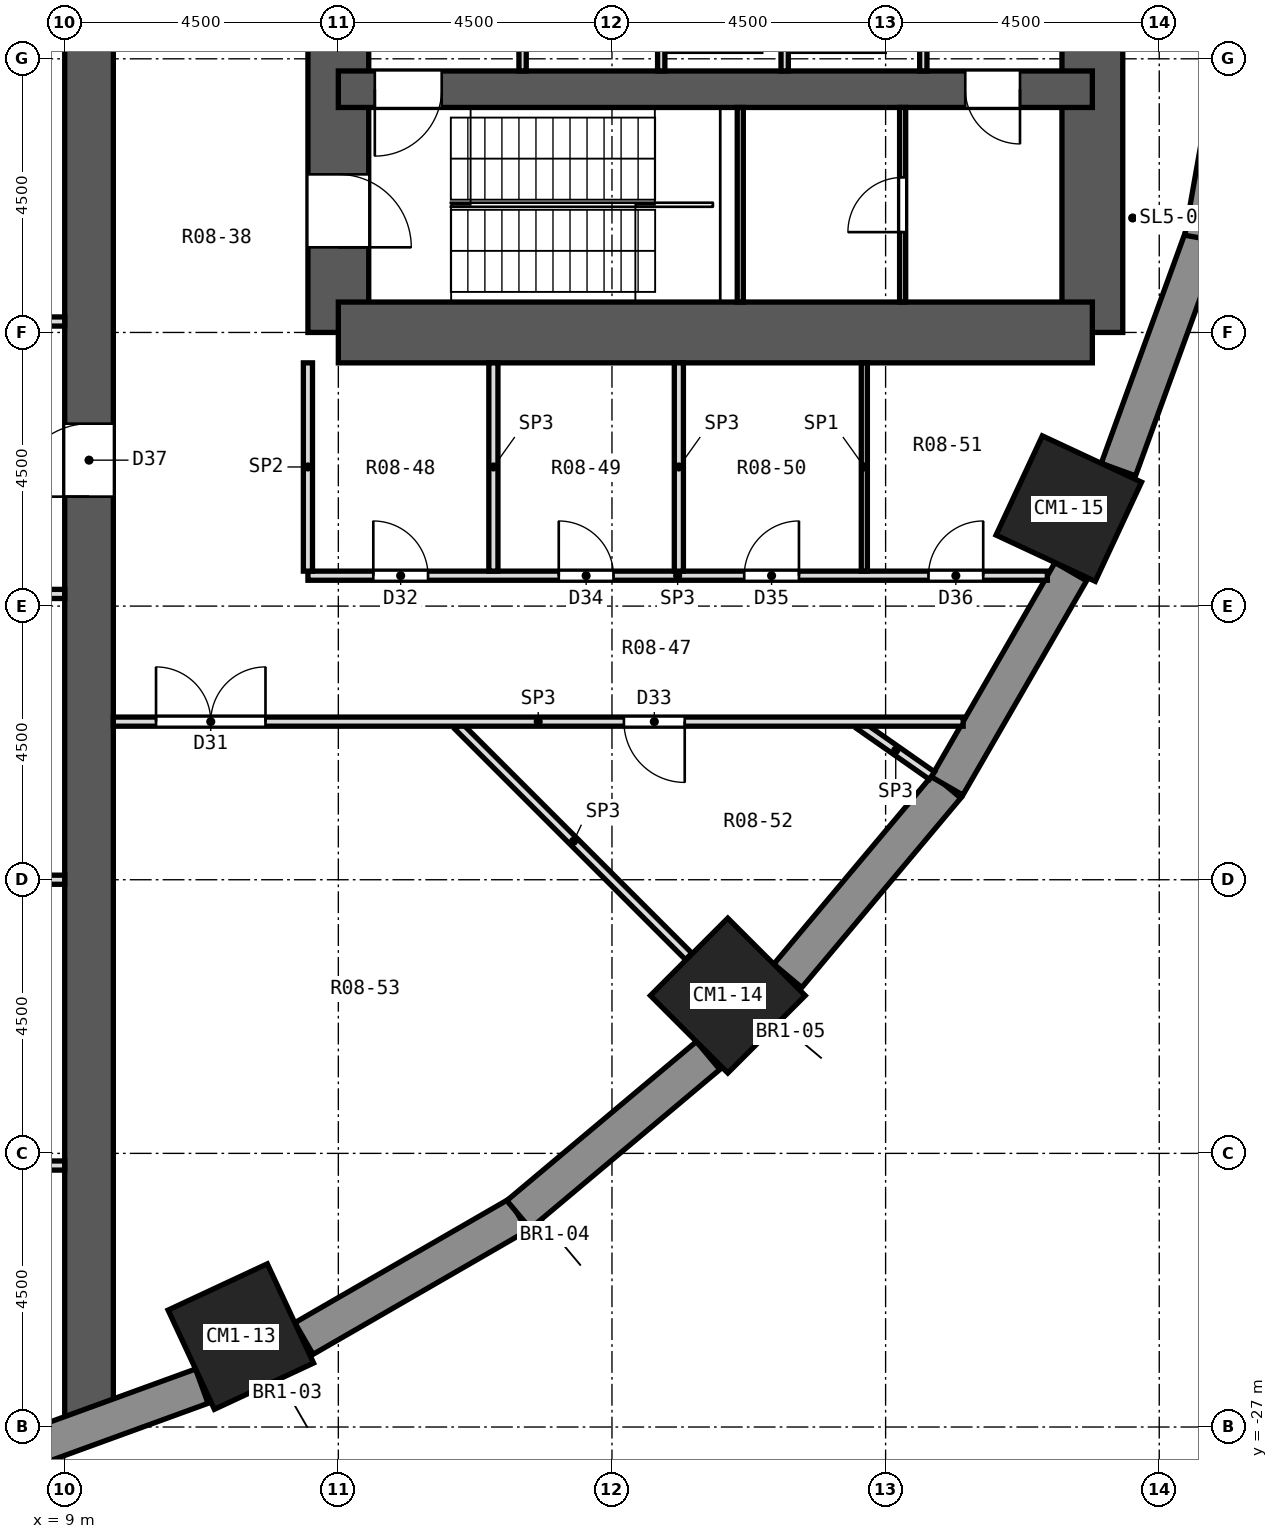
"""IFC4 building model, lengths in metres.
Left out: names, types, materials, properties, quantities, classifications, styles, units other than length and angle.
Written with IfcOpenShell. Run it as: python <this file> out.ifc"""

import sys

from ifc_helpers import new_model, si_unit, direction, frame, frame_2d, origin, origin_2d, place, context, subcontext, project, spatial, rectangle, extrude, element, fill, save


model = new_model("IFC4")
c1 = context("Model", 3, precision=1e-05, world=origin(), true_north=direction((0.0, 1.0)))
c2 = subcontext(c1, "Body", "Model", "MODEL_VIEW")
j1 = project(units=[si_unit("LENGTHUNIT", "METRE"), si_unit("PLANEANGLEUNIT", "RADIAN")], contexts=[c1])
p1 = place(None, origin())
s1 = spatial("IfcSite", under=j1, at=p1, CompositionType="ELEMENT")
p2 = place(p1, origin())
s2 = spatial("IfcBuilding", under=s1, at=p2, CompositionType="ELEMENT")
p3 = place(p2, frame((0.0, 0.0, 21.8)))
s3 = spatial("IfcBuildingStorey", under=s2, at=p3, CompositionType="ELEMENT", Elevation=21.8)
for number, where, z_axis, x_axis in (
    (1, (11.897, -25.512, 0.0), (0.0, 0.0, 1.0), (0.423, -0.906, 0.0)),
    (2, (19.905, -19.905, 0.0), (0.0, 0.0, 1.0), (0.707, -0.707, 0.0)),
    (3, (25.512, -11.897, 0.0), (0.0, 0.0, 1.0), (0.906, -0.423, 0.0)),
):
    element("IfcColumn", number, at=place(p3, frame(where, z_axis=z_axis, x_axis=x_axis)), inside=s3, PredefinedType="COLUMN", context=c2, shape_type="SweptSolid", body=[
        extrude(rectangle(XDim=1.8, YDim=1.8, at=origin_2d()), origin(), (0.0, 0.0, 1.0), 4.5),
    ])
p4 = place(p3, frame((13.5, -9.0, 0.0), z_axis=(0.0, 0.0, 1.0), x_axis=(0.0, 1.0, 0.0)))
e4 = element("IfcWall", 4, at=p4, inside=s3, PredefinedType="SHEAR", context=c2, shape_type="SweptSolid", body=[
    extrude(rectangle(XDim=18.0, YDim=1.0, at=frame_2d((9.0, 0.0))), origin(), (0.0, 0.0, 1.0), 4.5),
])
p5 = place(p4, frame((15.4, 0.0, 0.0)))
e5 = element("IfcOpeningElement", 5, at=p5, cuts=e4, PredefinedType="OPENING", context=c2, shape_type="SweptSolid", body=[
    extrude(rectangle(XDim=1.2, YDim=2.1, at=frame_2d((0.6, 1.05))), frame((0.0, 0.512, 0.0), z_axis=(0.0, -1.0, 0.0), x_axis=(1.0, 0.0, 0.0)), (0.0, 0.0, 1.0), 1.024),
])
p6 = place(p4, frame((1.4, 0.0, 0.0)))
e6 = element("IfcOpeningElement", 6, at=p6, cuts=e4, PredefinedType="OPENING", context=c2, shape_type="SweptSolid", body=[
    extrude(rectangle(XDim=1.2, YDim=2.1, at=frame_2d((0.6, 1.05))), frame((0.0, 0.512, 0.0), z_axis=(0.0, -1.0, 0.0), x_axis=(1.0, 0.0, 0.0)), (0.0, 0.0, 1.0), 1.024),
])
p7 = place(p4, frame((7.5, 0.0, 0.0)))
e7 = element("IfcOpeningElement", 7, at=p7, cuts=e4, PredefinedType="OPENING", context=c2, shape_type="SweptSolid", body=[
    extrude(rectangle(XDim=3.0, YDim=2.4, at=frame_2d((1.5, 1.2))), frame((0.0, 0.512, 0.0), z_axis=(0.0, -1.0, 0.0), x_axis=(1.0, 0.0, 0.0)), (0.0, 0.0, 1.0), 1.024),
])
p8 = place(p3, frame((25.9, -9.0, 0.0), z_axis=(0.0, 0.0, 1.0), x_axis=(0.0, 1.0, 0.0)))
e8 = element("IfcWall", 8, at=p8, inside=s3, PredefinedType="SHEAR", context=c2, shape_type="SweptSolid", body=[
    extrude(rectangle(XDim=18.0, YDim=1.0, at=frame_2d((9.0, 0.0))), origin(), (0.0, 0.0, 1.0), 4.5),
])
p9 = place(p3, frame((13.5, -9.0, 0.0), z_axis=(0.0, 0.0, 1.0), x_axis=(1.0, 0.0, 0.0)))
e9 = element("IfcWall", 9, at=p9, inside=s3, PredefinedType="SHEAR", context=c2, shape_type="SweptSolid", body=[
    extrude(rectangle(XDim=12.4, YDim=1.0, at=frame_2d((6.2, 0.0))), origin(), (0.0, 0.0, 1.0), 4.5),
])
p10 = place(p3, frame((13.5, -5.0, 0.0), z_axis=(0.0, 0.0, 1.0), x_axis=(1.0, 0.0, 0.0)))
e10 = element("IfcWall", 10, at=p10, inside=s3, PredefinedType="SHEAR", context=c2, shape_type="SweptSolid", body=[
    extrude(rectangle(XDim=12.4, YDim=0.6, at=frame_2d((6.2, 0.0))), origin(), (0.0, 0.0, 1.0), 4.5),
])
p11 = place(p10, frame((10.31, 0.0, 0.0)))
e11 = element("IfcOpeningElement", 11, at=p11, cuts=e10, PredefinedType="OPENING", context=c2, shape_type="SweptSolid", body=[
    extrude(rectangle(XDim=0.9, YDim=2.1, at=frame_2d((0.45, 1.05))), frame((0.0, 0.312, 0.0), z_axis=(0.0, -1.0, 0.0), x_axis=(1.0, 0.0, 0.0)), (0.0, 0.0, 1.0), 0.624),
])
p12 = place(p10, frame((0.6, 0.0, 0.0)))
e12 = element("IfcOpeningElement", 12, at=p12, cuts=e10, PredefinedType="OPENING", context=c2, shape_type="SweptSolid", body=[
    extrude(rectangle(XDim=1.1, YDim=2.1, at=frame_2d((0.55, 1.05))), frame((0.0, 0.312, 0.0), z_axis=(0.0, -1.0, 0.0), x_axis=(1.0, 0.0, 0.0)), (0.0, 0.0, 1.0), 0.624),
])
p13 = place(p3, frame((9.4, -27.077, 0.0), z_axis=(0.0, 0.0, 1.0), x_axis=(0.0, 1.0, 0.0)))
e13 = element("IfcWall", 13, at=p13, inside=s3, PredefinedType="SHEAR", context=c2, shape_type="SweptSolid", body=[
    extrude(rectangle(XDim=54.154, YDim=0.8, at=frame_2d((27.077, 0.0))), origin(), (0.0, 0.0, 1.0), 4.5),
])
p14 = place(p13, frame((15.377, 0.0, 0.0)))
e14 = element("IfcOpeningElement", 14, at=p14, cuts=e13, PredefinedType="OPENING", context=c2, shape_type="SweptSolid", body=[
    extrude(rectangle(XDim=1.2, YDim=2.1, at=frame_2d((0.6, 1.05))), frame((0.0, 0.412, 0.0), z_axis=(0.0, -1.0, 0.0), x_axis=(1.0, 0.0, 0.0)), (0.0, 0.0, 1.0), 0.824),
])
p15 = place(p13, frame((37.577, 0.0, 0.0)))
e15 = element("IfcOpeningElement", 15, at=p15, cuts=e13, PredefinedType="OPENING", context=c2, shape_type="SweptSolid", body=[
    extrude(rectangle(XDim=1.2, YDim=2.1, at=frame_2d((0.6, 1.05))), frame((0.0, 0.412, 0.0), z_axis=(0.0, -1.0, 0.0), x_axis=(1.0, 0.0, 0.0)), (0.0, 0.0, 1.0), 0.824),
])
p16 = place(p3, frame((7.431, -27.72, 0.0), z_axis=(0.0, 0.0, 1.0), x_axis=(0.939683013865, 0.342046536971, 0.0)))
e16 = element("IfcWall", 16, at=p16, inside=s3, PredefinedType="SOLIDWALL", context=c2, shape_type="SweptSolid", body=[
    extrude(rectangle(XDim=4.069, YDim=0.6, at=frame_2d((2.035, 0.0))), origin(), (0.0, 0.0, 1.0), 3.95),
])
p17 = place(p3, frame((12.934, -25.545, 0.0), z_axis=(0.0, 0.0, 1.0), x_axis=(0.866011732453, 0.500023678693, 0.0)))
e17 = element("IfcWall", 17, at=p17, inside=s3, PredefinedType="SOLIDWALL", context=c2, shape_type="SweptSolid", body=[
    extrude(rectangle(XDim=4.069, YDim=0.6, at=frame_2d((2.035, 0.0))), origin(), (0.0, 0.0, 1.0), 2.15),
])
for number, where, z_axis, x_axis in (
    (18, (16.464, -23.506, 0.0), (0.0, 0.0, 1.0), (0.766, 0.643, 0.0)),
    (19, (20.891, -19.581, 0.0), (0.0, 0.0, 1.0), (0.643, 0.766, 0.0)),
):
    element("IfcWall", number, at=place(p3, frame(where, z_axis=z_axis, x_axis=x_axis)), inside=s3, PredefinedType="SOLIDWALL", context=c2, shape_type="SweptSolid", body=[
        extrude(rectangle(XDim=4.069, YDim=0.6, at=frame_2d((2.035, 0.0))), origin(), (0.0, 0.0, 1.0), 2.15),
    ])
p18 = place(p3, frame((23.51, -16.458, 0.0), z_axis=(0.0, 0.0, 1.0), x_axis=(0.500023678693, 0.866011732453, 0.0)))
e20 = element("IfcWall", 20, at=p18, inside=s3, PredefinedType="SOLIDWALL", context=c2, shape_type="SweptSolid", body=[
    extrude(rectangle(XDim=4.069, YDim=0.6, at=frame_2d((2.035, 0.0))), origin(), (0.0, 0.0, 1.0), 2.15),
])
p19 = place(p3, frame((26.328, -11.255, 0.0), z_axis=(0.0, 0.0, 1.0), x_axis=(0.342034744565, 0.939687306241, 0.0)))
e21 = element("IfcWall", 21, at=p19, inside=s3, PredefinedType="SOLIDWALL", context=c2, shape_type="SweptSolid", body=[
    extrude(rectangle(XDim=4.099, YDim=0.6, at=frame_2d((2.05, 0.0))), origin(), (0.0, 0.0, 1.0), 2.15),
])
p20 = place(p3, frame((27.716, -7.454, 0.0), z_axis=(0.0, 0.0, 1.0), x_axis=(0.173673210505, 0.984803338719, 0.0)))
e22 = element("IfcWall", 22, at=p20, inside=s3, PredefinedType="SOLIDWALL", context=c2, shape_type="SweptSolid", body=[
    extrude(rectangle(XDim=4.099, YDim=0.6, at=frame_2d((2.05, 0.0))), origin(), (0.0, 0.0, 1.0), 2.15),
])
p21 = place(p3, frame((15.474, -15.474, 0.0), z_axis=(0.0, 0.0, 1.0), x_axis=(0.707197938435, -0.707015612185, 0.0)))
e23 = element("IfcWall", 23, at=p21, inside=s3, PredefinedType="PARTITIONING", context=c2, shape_type="SweptSolid", body=[
    extrude(rectangle(XDim=5.356, YDim=0.15, at=frame_2d((2.678, 0.0))), origin(), (0.0, 0.0, 1.0), 3.95),
])
p22 = place(p3, frame((22.071, -15.455, 0.0), z_axis=(0.0, 0.0, 1.0), x_axis=(0.819334469193, -0.573315818369, 0.0)))
e24 = element("IfcWall", 24, at=p22, inside=s3, PredefinedType="PARTITIONING", context=c2, shape_type="SweptSolid", body=[
    extrude(rectangle(XDim=1.454, YDim=0.15, at=frame_2d((0.727, 0.0))), origin(), (0.0, 0.0, 1.0), 3.95),
])
for number, where, z_axis, x_axis in (
    (25, (2.175, -22.7, 0.0), (0.0, 0.0, 1.0), (1.0, 0.0, 0.0)),
    (26, (2.175, -18.0, 0.0), (0.0, 0.0, 1.0), (1.0, 0.0, 0.0)),
):
    element("IfcWall", number, at=place(p3, frame(where, z_axis=z_axis, x_axis=x_axis)), inside=s3, PredefinedType="PARTITIONING", context=c2, shape_type="SweptSolid", body=[
        extrude(rectangle(XDim=6.825, YDim=0.15, at=frame_2d((3.413, 0.0))), origin(), (0.0, 0.0, 1.0), 3.95),
    ])
p23 = place(p3, frame((9.8, -15.4, 0.0), z_axis=(0.0, 0.0, 1.0), x_axis=(1.0, 0.0, 0.0)))
e27 = element("IfcWall", 27, at=p23, inside=s3, PredefinedType="PARTITIONING", context=c2, shape_type="SweptSolid", body=[
    extrude(rectangle(XDim=13.975, YDim=0.15, at=frame_2d((6.987, 0.0))), origin(), (0.0, 0.0, 1.0), 3.95),
])
p24 = place(p23, frame((0.702, 0.0, 0.0)))
e28 = element("IfcOpeningElement", 28, at=p24, cuts=e27, PredefinedType="OPENING", context=c2, shape_type="SweptSolid", body=[
    extrude(rectangle(XDim=1.8, YDim=2.1, at=frame_2d((0.9, 1.05))), frame((0.0, 0.087, 0.0), z_axis=(0.0, -1.0, 0.0), x_axis=(1.0, 0.0, 0.0)), (0.0, 0.0, 1.0), 0.174),
])
p25 = place(p23, frame((8.396, 0.0, 0.0)))
e29 = element("IfcOpeningElement", 29, at=p25, cuts=e27, PredefinedType="OPENING", context=c2, shape_type="SweptSolid", body=[
    extrude(rectangle(XDim=1.0, YDim=2.1, at=frame_2d((0.5, 1.05))), frame((0.0, 0.087, 0.0), z_axis=(0.0, -1.0, 0.0), x_axis=(1.0, 0.0, 0.0)), (0.0, 0.0, 1.0), 0.174),
])
p26 = place(p3, frame((2.1, -13.3, 0.0), z_axis=(0.0, 0.0, 1.0), x_axis=(1.0, 0.0, 0.0)))
e30 = element("IfcWall", 30, at=p26, inside=s3, PredefinedType="PARTITIONING", context=c2, shape_type="SweptSolid", body=[
    extrude(rectangle(XDim=6.9, YDim=0.15, at=frame_2d((3.45, 0.0))), origin(), (0.0, 0.0, 1.0), 3.95),
])
p27 = place(p3, frame((13.0, -13.0, 0.0), z_axis=(0.0, 0.0, 1.0), x_axis=(1.0, 0.0, 0.0)))
e31 = element("IfcWall", 31, at=p27, inside=s3, PredefinedType="PARTITIONING", context=c2, shape_type="SweptSolid", body=[
    extrude(rectangle(XDim=12.16, YDim=0.15, at=frame_2d((6.08, 0.0))), origin(), (0.0, 0.0, 1.0), 3.95),
])
p28 = place(p27, frame((1.075, 0.0, 0.0)))
e32 = element("IfcOpeningElement", 32, at=p28, cuts=e31, PredefinedType="OPENING", context=c2, shape_type="SweptSolid", body=[
    extrude(rectangle(XDim=0.9, YDim=2.1, at=frame_2d((0.45, 1.05))), frame((0.0, 0.087, 0.0), z_axis=(0.0, -1.0, 0.0), x_axis=(1.0, 0.0, 0.0)), (0.0, 0.0, 1.0), 0.174),
])
p29 = place(p27, frame((4.125, 0.0, 0.0)))
e33 = element("IfcOpeningElement", 33, at=p29, cuts=e31, PredefinedType="OPENING", context=c2, shape_type="SweptSolid", body=[
    extrude(rectangle(XDim=0.9, YDim=2.1, at=frame_2d((0.45, 1.05))), frame((0.0, 0.087, 0.0), z_axis=(0.0, -1.0, 0.0), x_axis=(1.0, 0.0, 0.0)), (0.0, 0.0, 1.0), 0.174),
])
p30 = place(p27, frame((7.175, 0.0, 0.0)))
e34 = element("IfcOpeningElement", 34, at=p30, cuts=e31, PredefinedType="OPENING", context=c2, shape_type="SweptSolid", body=[
    extrude(rectangle(XDim=0.9, YDim=2.1, at=frame_2d((0.45, 1.05))), frame((0.0, 0.087, 0.0), z_axis=(0.0, -1.0, 0.0), x_axis=(1.0, 0.0, 0.0)), (0.0, 0.0, 1.0), 0.174),
])
p31 = place(p27, frame((10.205, 0.0, 0.0)))
e35 = element("IfcOpeningElement", 35, at=p31, cuts=e31, PredefinedType="OPENING", context=c2, shape_type="SweptSolid", body=[
    extrude(rectangle(XDim=0.9, YDim=2.1, at=frame_2d((0.45, 1.05))), frame((0.0, 0.087, 0.0), z_axis=(0.0, -1.0, 0.0), x_axis=(1.0, 0.0, 0.0)), (0.0, 0.0, 1.0), 0.174),
])
p32 = place(p3, frame((-9.0, -8.82, 0.0), z_axis=(0.0, 0.0, 1.0), x_axis=(1.0, 0.0, 0.0)))
e36 = element("IfcWall", 36, at=p32, inside=s3, PredefinedType="PARTITIONING", context=c2, shape_type="SweptSolid", body=[
    extrude(rectangle(XDim=18.0, YDim=0.15, at=frame_2d((9.0, 0.0))), origin(), (0.0, 0.0, 1.0), 3.95),
])
p33 = place(p3, frame((22.15, -12.925, 0.0), z_axis=(0.0, 0.0, 1.0), x_axis=(0.0, 1.0, 0.0)))
e37 = element("IfcWall", 37, at=p33, inside=s3, PredefinedType="PARTITIONING", context=c2, shape_type="SweptSolid", body=[
    extrude(rectangle(XDim=3.425, YDim=0.1, at=frame_2d((1.712, 0.0))), origin(), (0.0, 0.0, 1.0), 3.95),
])
for number, where, z_axis, x_axis in (
    (38, (19.1, -12.925, 0.0), (0.0, 0.0, 1.0), (0.0, 1.0, 0.0)),
    (39, (16.05, -12.925, 0.0), (0.0, 0.0, 1.0), (0.0, 1.0, 0.0)),
    (40, (13.0, -12.925, 0.0), (0.0, 0.0, 1.0), (0.0, 1.0, 0.0)),
):
    element("IfcWall", number, at=place(p3, frame(where, z_axis=z_axis, x_axis=x_axis)), inside=s3, PredefinedType="PARTITIONING", context=c2, shape_type="SweptSolid", body=[
        extrude(rectangle(XDim=3.425, YDim=0.15, at=frame_2d((1.712, 0.0))), origin(), (0.0, 0.0, 1.0), 3.95),
    ])
p34 = place(p3, frame((16.53, -4.7, 0.0), z_axis=(0.0, 0.0, 1.0), x_axis=(0.0, 1.0, 0.0)))
e41 = element("IfcWall", 41, at=p34, inside=s3, PredefinedType="PARTITIONING", context=c2, shape_type="SweptSolid", body=[
    extrude(rectangle(XDim=2.4, YDim=0.12, at=frame_2d((1.2, 0.0))), origin(), (0.0, 0.0, 1.0), 3.95),
])
p35 = place(p34, frame((0.65, 0.0, 0.0)))
e42 = element("IfcOpeningElement", 42, at=p35, cuts=e41, PredefinedType="OPENING", context=c2, shape_type="SweptSolid", body=[
    extrude(rectangle(XDim=1.1, YDim=2.1, at=frame_2d((0.55, 1.05))), frame((0.0, 0.072, 0.0), z_axis=(0.0, -1.0, 0.0), x_axis=(1.0, 0.0, 0.0)), (0.0, 0.0, 1.0), 0.144),
])
for number, where, z_axis, x_axis in (
    (43, (18.81, -4.7, 0.0), (0.0, 0.0, 1.0), (0.0, 1.0, 0.0)),
    (44, (20.84, -4.7, 0.0), (0.0, 0.0, 1.0), (0.0, 1.0, 0.0)),
    (45, (23.12, -4.7, 0.0), (0.0, 0.0, 1.0), (0.0, 1.0, 0.0)),
):
    element("IfcWall", number, at=place(p3, frame(where, z_axis=z_axis, x_axis=x_axis)), inside=s3, PredefinedType="PARTITIONING", context=c2, shape_type="SweptSolid", body=[
        extrude(rectangle(XDim=2.4, YDim=0.12, at=frame_2d((1.2, 0.0))), origin(), (0.0, 0.0, 1.0), 3.95),
    ])
p36 = place(p3, frame((20.11, -8.5, 0.0), z_axis=(0.0, 0.0, 1.0), x_axis=(0.0, 1.0, 0.0)))
e46 = element("IfcWall", 46, at=p36, inside=s3, PredefinedType="PARTITIONING", context=c2, shape_type="SweptSolid", body=[
    extrude(rectangle(XDim=3.2, YDim=0.1, at=frame_2d((1.6, 0.0))), origin(), (0.0, 0.0, 1.0), 3.95),
])
p37 = place(p3, frame((22.78, -8.5, 0.0), z_axis=(0.0, 0.0, 1.0), x_axis=(0.0, 1.0, 0.0)))
e47 = element("IfcWall", 47, at=p37, inside=s3, PredefinedType="PARTITIONING", context=c2, shape_type="SweptSolid", body=[
    extrude(rectangle(XDim=3.2, YDim=0.1, at=frame_2d((1.6, 0.0))), origin(), (0.0, 0.0, 1.0), 3.95),
])
p38 = place(p37, frame((1.15, 0.0, 0.0)))
e48 = element("IfcOpeningElement", 48, at=p38, cuts=e47, PredefinedType="OPENING", context=c2, shape_type="SweptSolid", body=[
    extrude(rectangle(XDim=0.9, YDim=2.1, at=frame_2d((0.45, 1.05))), frame((0.0, 0.062, 0.0), z_axis=(0.0, -1.0, 0.0), x_axis=(1.0, 0.0, 0.0)), (0.0, 0.0, 1.0), 0.124),
])
p39 = place(p24, origin())
e49 = element("IfcDoor", 49, at=p39, inside=s3, OperationType="DOUBLE_DOOR_SINGLE_SWING", PredefinedType="DOOR", context=c2, shape_type="SweptSolid", body=[
    extrude(rectangle(XDim=1.8, YDim=2.1, at=frame_2d((0.9, 1.05))), frame((0.0, 0.025, 0.0), z_axis=(0.0, -1.0, 0.0), x_axis=(1.0, 0.0, 0.0)), (0.0, 0.0, 1.0), 0.05),
])
fill(e28, e49)
p40 = place(p28, origin())
e50 = element("IfcDoor", 50, at=p40, inside=s3, OperationType="SINGLE_SWING_LEFT", PredefinedType="DOOR", context=c2, shape_type="SweptSolid", body=[
    extrude(rectangle(XDim=0.9, YDim=2.1, at=frame_2d((0.45, 1.05))), frame((0.0, 0.025, 0.0), z_axis=(0.0, -1.0, 0.0), x_axis=(1.0, 0.0, 0.0)), (0.0, 0.0, 1.0), 0.05),
])
fill(e32, e50)
p41 = place(p25, frame((1.0, 0.0, 0.0), z_axis=(0.0, 0.0, 1.0), x_axis=(-1.0, 0.0, 0.0)))
e51 = element("IfcDoor", 51, at=p41, inside=s3, OperationType="SINGLE_SWING_LEFT", PredefinedType="DOOR", context=c2, shape_type="SweptSolid", body=[
    extrude(rectangle(XDim=1.0, YDim=2.1, at=frame_2d((0.5, 1.05))), frame((0.0, 0.025, 0.0), z_axis=(0.0, -1.0, 0.0), x_axis=(1.0, 0.0, 0.0)), (0.0, 0.0, 1.0), 0.05),
])
fill(e29, e51)
p42 = place(p29, origin())
e52 = element("IfcDoor", 52, at=p42, inside=s3, OperationType="SINGLE_SWING_LEFT", PredefinedType="DOOR", context=c2, shape_type="SweptSolid", body=[
    extrude(rectangle(XDim=0.9, YDim=2.1, at=frame_2d((0.45, 1.05))), frame((0.0, 0.025, 0.0), z_axis=(0.0, -1.0, 0.0), x_axis=(1.0, 0.0, 0.0)), (0.0, 0.0, 1.0), 0.05),
])
fill(e33, e52)
p43 = place(p30, origin())
e53 = element("IfcDoor", 53, at=p43, inside=s3, OperationType="SINGLE_SWING_RIGHT", PredefinedType="DOOR", context=c2, shape_type="SweptSolid", body=[
    extrude(rectangle(XDim=0.9, YDim=2.1, at=frame_2d((0.45, 1.05))), frame((0.0, 0.025, 0.0), z_axis=(0.0, -1.0, 0.0), x_axis=(1.0, 0.0, 0.0)), (0.0, 0.0, 1.0), 0.05),
])
fill(e34, e53)
p44 = place(p31, origin())
e54 = element("IfcDoor", 54, at=p44, inside=s3, OperationType="SINGLE_SWING_RIGHT", PredefinedType="DOOR", context=c2, shape_type="SweptSolid", body=[
    extrude(rectangle(XDim=0.9, YDim=2.1, at=frame_2d((0.45, 1.05))), frame((0.0, 0.025, 0.0), z_axis=(0.0, -1.0, 0.0), x_axis=(1.0, 0.0, 0.0)), (0.0, 0.0, 1.0), 0.05),
])
fill(e35, e54)
p45 = place(p14, origin())
e55 = element("IfcDoor", 55, at=p45, inside=s3, OperationType="SINGLE_SWING_LEFT", PredefinedType="DOOR", context=c2, shape_type="SweptSolid", body=[
    extrude(rectangle(XDim=1.2, YDim=2.1, at=frame_2d((0.6, 1.05))), frame((0.0, 0.025, 0.0), z_axis=(0.0, -1.0, 0.0), x_axis=(1.0, 0.0, 0.0)), (0.0, 0.0, 1.0), 0.05),
])
fill(e14, e55)
p46 = place(p38, origin())
e56 = element("IfcDoor", 56, at=p46, inside=s3, OperationType="SINGLE_SWING_LEFT", PredefinedType="DOOR", context=c2, shape_type="SweptSolid", body=[
    extrude(rectangle(XDim=0.9, YDim=2.1, at=frame_2d((0.45, 1.05))), frame((0.0, 0.025, 0.0), z_axis=(0.0, -1.0, 0.0), x_axis=(1.0, 0.0, 0.0)), (0.0, 0.0, 1.0), 0.05),
])
fill(e48, e56)
p47 = place(p11, frame((0.9, 0.0, 0.0), z_axis=(0.0, 0.0, 1.0), x_axis=(-1.0, 0.0, 0.0)))
e57 = element("IfcDoor", 57, at=p47, inside=s3, OperationType="SINGLE_SWING_LEFT", PredefinedType="DOOR", context=c2, shape_type="SweptSolid", body=[
    extrude(rectangle(XDim=0.9, YDim=2.1, at=frame_2d((0.45, 1.05))), frame((0.0, 0.025, 0.0), z_axis=(0.0, -1.0, 0.0), x_axis=(1.0, 0.0, 0.0)), (0.0, 0.0, 1.0), 0.05),
])
fill(e11, e57)
p48 = place(p12, frame((1.1, 0.0, 0.0), z_axis=(0.0, 0.0, 1.0), x_axis=(-1.0, 0.0, 0.0)))
e58 = element("IfcDoor", 58, at=p48, inside=s3, OperationType="SINGLE_SWING_RIGHT", PredefinedType="DOOR", context=c2, shape_type="SweptSolid", body=[
    extrude(rectangle(XDim=1.1, YDim=2.1, at=frame_2d((0.55, 1.05))), frame((0.0, 0.025, 0.0), z_axis=(0.0, -1.0, 0.0), x_axis=(1.0, 0.0, 0.0)), (0.0, 0.0, 1.0), 0.05),
])
fill(e12, e58)
p49 = place(p6, frame((1.2, 0.0, 0.0), z_axis=(0.0, 0.0, 1.0), x_axis=(-1.0, 0.0, 0.0)))
e59 = element("IfcDoor", 59, at=p49, inside=s3, OperationType="SINGLE_SWING_RIGHT", PredefinedType="DOOR", context=c2, shape_type="SweptSolid", body=[
    extrude(rectangle(XDim=1.2, YDim=2.1, at=frame_2d((0.6, 1.05))), frame((0.0, 0.025, 0.0), z_axis=(0.0, -1.0, 0.0), x_axis=(1.0, 0.0, 0.0)), (0.0, 0.0, 1.0), 0.05),
])
fill(e6, e59)
save(model, sys.argv[1])
